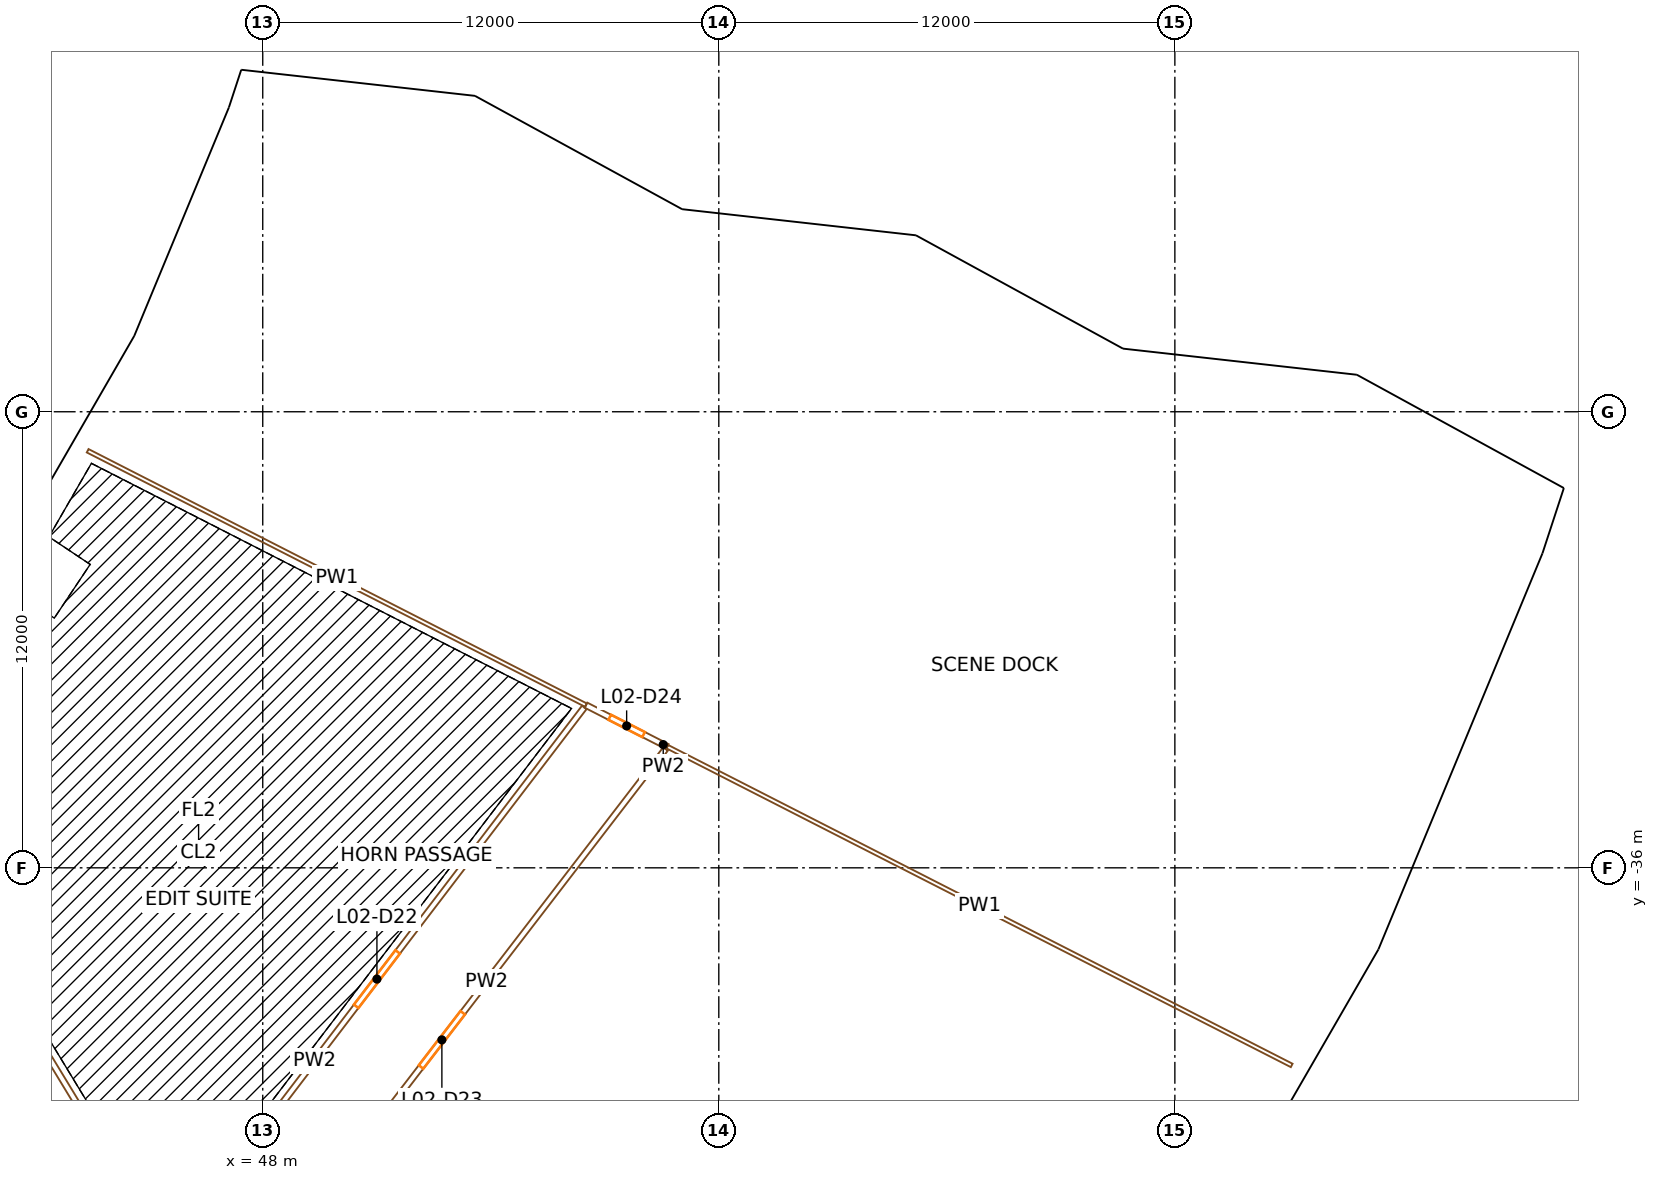
"""IFC4 building model, lengths in metres.
Left out: names, types, materials, properties, quantities, classifications, styles, units other than length and angle.
Written with IfcOpenShell. Run it as: python <this file> out.ifc"""

import sys

from ifc_helpers import new_model, si_unit, direction, frame, frame_2d, origin, origin_2d, place, context, subcontext, project, spatial, rectangle, extrude, element, fill, save


model = new_model("IFC4")
c1 = context("Model", 3, precision=1e-05, world=origin(), true_north=direction((0.0, 1.0)))
c2 = subcontext(c1, "Body", "Model", "MODEL_VIEW")
j1 = project(units=[si_unit("LENGTHUNIT", "METRE"), si_unit("PLANEANGLEUNIT", "RADIAN")], contexts=[c1])
p1 = place(None, origin())
s1 = spatial("IfcSite", under=j1, at=p1, CompositionType="ELEMENT")
p2 = place(p1, origin())
s2 = spatial("IfcBuilding", under=s1, at=p2, CompositionType="ELEMENT")
p3 = place(p2, frame((0.0, 0.0, 18.0)))
s3 = spatial("IfcBuildingStorey", under=s2, at=p3, CompositionType="ELEMENT", Elevation=18.0)
p4 = place(p3, frame((43.795, -38.407, 0.0), z_axis=(0.0, 0.0, 1.0), x_axis=(0.6593458151, 0.751839807479, 0.0)))
e1 = element("IfcColumn", 1, at=p4, inside=s3, PredefinedType="COLUMN", context=c2, shape_type="SweptSolid", body=[
    extrude(rectangle(XDim=1.4, YDim=1.8, at=origin_2d()), origin(), (0.0, 0.0, 1.0), 9.0),
])
p5 = place(p3, frame((42.197, -28.195, 0.0), z_axis=(0.0, 0.0, 1.0), x_axis=(0.55557023302, 0.831469612303, 0.0)))
e2 = element("IfcColumn", 2, at=p5, inside=s3, PredefinedType="COLUMN", context=c2, shape_type="SweptSolid", body=[
    extrude(rectangle(XDim=1.1, YDim=1.3, at=origin_2d()), origin(), (0.0, 0.0, 1.0), 9.0),
])
for number, where, z_axis, x_axis in (
    (3, (48.433, -32.362, 0.0), (0.0, 0.0, 1.0), (0.556, 0.831, 0.0)),
    (4, (64.647, -43.196, 0.0), (0.0, 0.0, 1.0), (0.556, 0.831, 0.0)),
):
    element("IfcColumn", number, at=place(p3, frame(where, z_axis=z_axis, x_axis=x_axis)), inside=s3, PredefinedType="COLUMN", context=c2, shape_type="SweptSolid", body=[
        extrude(rectangle(XDim=1.4, YDim=1.8, at=origin_2d()), origin(), (0.0, 0.0, 1.0), 9.0),
    ])
p6 = place(p3, frame((45.516, -22.446, 0.0), z_axis=(0.0, 0.0, 1.0), x_axis=(0.442288690219, 0.896872741533, 0.0)))
e5 = element("IfcColumn", 5, at=p6, inside=s3, PredefinedType="COLUMN", context=c2, shape_type="SweptSolid", body=[
    extrude(rectangle(XDim=1.1, YDim=1.3, at=origin_2d()), origin(), (0.0, 0.0, 1.0), 9.0),
])
for number, where, z_axis, x_axis in (
    (6, (52.243, -25.763, 0.0), (0.0, 0.0, 1.0), (0.442, 0.897, 0.0)),
    (7, (69.732, -34.388, 0.0), (0.0, 0.0, 1.0), (0.442, 0.897, 0.0)),
):
    element("IfcColumn", number, at=place(p3, frame(where, z_axis=z_axis, x_axis=x_axis)), inside=s3, PredefinedType="COLUMN", context=c2, shape_type="SweptSolid", body=[
        extrude(rectangle(XDim=1.4, YDim=1.8, at=origin_2d()), origin(), (0.0, 0.0, 1.0), 9.0),
    ])
for number, where, z_axis, x_axis in (
    (8, (76.458, -37.705, 0.0), (0.0, 0.0, 1.0), (0.442, 0.897, 0.0)),
    (9, (48.057, -16.313, 0.0), (0.0, 0.0, 1.0), (0.321, 0.947, 0.0)),
):
    element("IfcColumn", number, at=place(p3, frame(where, z_axis=z_axis, x_axis=x_axis)), inside=s3, PredefinedType="COLUMN", context=c2, shape_type="SweptSolid", body=[
        extrude(rectangle(XDim=1.1, YDim=1.3, at=origin_2d()), origin(), (0.0, 0.0, 1.0), 9.0),
    ])
for number, where, z_axis, x_axis in (
    (10, (55.159, -18.724, 0.0), (0.0, 0.0, 1.0), (0.321, 0.947, 0.0)),
    (11, (73.624, -24.992, 0.0), (0.0, 0.0, 1.0), (0.321, 0.947, 0.0)),
):
    element("IfcColumn", number, at=place(p3, frame(where, z_axis=z_axis, x_axis=x_axis)), inside=s3, PredefinedType="COLUMN", context=c2, shape_type="SweptSolid", body=[
        extrude(rectangle(XDim=1.4, YDim=1.8, at=origin_2d()), origin(), (0.0, 0.0, 1.0), 9.0),
    ])
p7 = place(p3, frame((80.726, -27.403, 0.0), z_axis=(0.0, 0.0, 1.0), x_axis=(0.321439465303, 0.946930129495, 0.0)))
e12 = element("IfcColumn", 12, at=p7, inside=s3, PredefinedType="COLUMN", context=c2, shape_type="SweptSolid", body=[
    extrude(rectangle(XDim=1.1, YDim=1.3, at=origin_2d()), origin(), (0.0, 0.0, 1.0), 9.0),
])
p8 = place(p3, frame((81.734, -25.99, 0.0), z_axis=(0.0, 0.0, 1.0), x_axis=(-0.877209140108, 0.480108450781, 0.0)))
e13 = element("IfcWall", 13, at=p8, inside=s3, PredefinedType="SOLIDWALL", context=c2, shape_type="SweptSolid", body=[
    extrude(rectangle(XDim=5.553, YDim=0.45, at=frame_2d((2.776, 0.0))), origin(), (0.0, 0.0, 1.0), 7.7),
])
p9 = place(p3, frame((76.804, -23.255, 0.0), z_axis=(0.0, 0.0, 1.0), x_axis=(-0.993813805196, 0.111059086081, 0.0)))
e14 = element("IfcWall", 14, at=p9, inside=s3, PredefinedType="SOLIDWALL", context=c2, shape_type="SweptSolid", body=[
    extrude(rectangle(XDim=6.362, YDim=0.45, at=frame_2d((3.181, 0.0))), origin(), (0.0, 0.0, 1.0), 7.7),
])
p10 = place(p3, frame((70.422, -22.479, 0.0), z_axis=(0.0, 0.0, 1.0), x_axis=(-0.877230259454, 0.480069861477, 0.0)))
e15 = element("IfcWall", 15, at=p10, inside=s3, PredefinedType="SOLIDWALL", context=c2, shape_type="SweptSolid", body=[
    extrude(rectangle(XDim=5.884, YDim=0.45, at=frame_2d((2.942, 0.0))), origin(), (0.0, 0.0, 1.0), 7.7),
])
p11 = place(p3, frame((65.202, -19.585, 0.0), z_axis=(0.0, 0.0, 1.0), x_axis=(-0.993818963433, 0.111012917816, 0.0)))
e16 = element("IfcWall", 16, at=p11, inside=s3, PredefinedType="SOLIDWALL", context=c2, shape_type="SweptSolid", body=[
    extrude(rectangle(XDim=6.36, YDim=0.45, at=frame_2d((3.18, 0.0))), origin(), (0.0, 0.0, 1.0), 7.7),
])
p12 = place(p3, frame((58.822, -18.81, 0.0), z_axis=(0.0, 0.0, 1.0), x_axis=(-0.87728135657, 0.479976480064, 0.0)))
e17 = element("IfcWall", 17, at=p12, inside=s3, PredefinedType="SOLIDWALL", context=c2, shape_type="SweptSolid", body=[
    extrude(rectangle(XDim=5.885, YDim=0.45, at=frame_2d((2.943, 0.0))), origin(), (0.0, 0.0, 1.0), 7.7),
])
p13 = place(p3, frame((53.599, -15.916, 0.0), z_axis=(0.0, 0.0, 1.0), x_axis=(-0.993827533543, 0.110936168908, 0.0)))
e18 = element("IfcWall", 18, at=p13, inside=s3, PredefinedType="SOLIDWALL", context=c2, shape_type="SweptSolid", body=[
    extrude(rectangle(XDim=6.265, YDim=0.45, at=frame_2d((3.133, 0.0))), origin(), (0.0, 0.0, 1.0), 7.7),
])
p14 = place(p3, frame((44.792, -22.155, 0.0), z_axis=(0.0, 0.0, 1.0), x_axis=(-0.50000447882, -0.866022817921, 0.0)))
e19 = element("IfcWall", 19, at=p14, inside=s3, PredefinedType="SOLIDWALL", context=c2, shape_type="SweptSolid", body=[
    extrude(rectangle(XDim=6.419, YDim=0.45, at=frame_2d((3.21, 0.0))), origin(), (0.0, 0.0, 1.0), 7.7),
])
p15 = place(p3, frame((47.327, -16.056, 0.0), z_axis=(0.0, 0.0, 1.0), x_axis=(-0.382692796414, -0.92387565374, 0.0)))
e20 = element("IfcWall", 20, at=p15, inside=s3, PredefinedType="SOLIDWALL", context=c2, shape_type="SweptSolid", body=[
    extrude(rectangle(XDim=6.576, YDim=0.45, at=frame_2d((3.288, 0.0))), origin(), (0.0, 0.0, 1.0), 7.7),
])
p16 = place(p3, frame((47.509, -15.497, 0.0), z_axis=(0.0, 0.0, 1.0), x_axis=(-0.311474670585, -0.950254455177, 0.0)))
e21 = element("IfcWall", 21, at=p16, inside=s3, PredefinedType="SOLIDWALL", context=c2, shape_type="SweptSolid", body=[
    extrude(rectangle(XDim=0.571, YDim=0.45, at=frame_2d((0.285, 0.0))), origin(), (0.0, 0.0, 1.0), 7.7),
])
p17 = place(p3, frame((71.512, -47.819, 0.0), z_axis=(0.0, 0.0, 1.0), x_axis=(0.500001430823, 0.866024577697, 0.0)))
e22 = element("IfcWall", 22, at=p17, inside=s3, PredefinedType="SOLIDWALL", context=c2, shape_type="SweptSolid", body=[
    extrude(rectangle(XDim=11.312, YDim=0.45, at=frame_2d((5.656, 0.0))), origin(), (0.0, 0.0, 1.0), 7.7),
])
p18 = place(p3, frame((77.176, -37.993, 0.0), z_axis=(0.0, 0.0, 1.0), x_axis=(0.382700611107, 0.923872416656, 0.0)))
e23 = element("IfcWall", 23, at=p18, inside=s3, PredefinedType="SOLIDWALL", context=c2, shape_type="SweptSolid", body=[
    extrude(rectangle(XDim=11.168, YDim=0.45, at=frame_2d((5.584, 0.0))), origin(), (0.0, 0.0, 1.0), 7.7),
])
p19 = place(p3, frame((81.457, -27.66, 0.0), z_axis=(0.0, 0.0, 1.0), x_axis=(0.311621150825, 0.95020642934, 0.0)))
e24 = element("IfcWall", 24, at=p19, inside=s3, PredefinedType="SOLIDWALL", context=c2, shape_type="SweptSolid", body=[
    extrude(rectangle(XDim=1.846, YDim=0.45, at=frame_2d((0.923, 0.0))), origin(), (0.0, 0.0, 1.0), 7.7),
])
p20 = place(p3, frame((41.648, -39.789, 0.0), z_axis=(0.0, 0.0, 1.0), x_axis=(0.519150554232, -0.854682807854, 0.0)))
e25 = element("IfcWall", 25, at=p20, inside=s3, PredefinedType="PARTITIONING", context=c2, shape_type="SweptSolid", body=[
    extrude(rectangle(XDim=7.5, YDim=0.15, at=frame_2d((3.75, 0.0))), origin(), (0.0, 0.0, 1.0), 7.6),
])
p21 = place(p3, frame((45.549, -46.076, 0.0), z_axis=(0.0, 0.0, 1.0), x_axis=(0.606707633542, 0.794925057727, 0.0)))
e26 = element("IfcWall", 26, at=p21, inside=s3, PredefinedType="PARTITIONING", context=c2, shape_type="SweptSolid", body=[
    extrude(rectangle(XDim=17.985, YDim=0.15, at=frame_2d((8.992, 0.0))), origin(), (0.0, 0.0, 1.0), 7.6),
])
p22 = place(p21, frame((8.092, 0.0, 0.0)))
e27 = element("IfcOpeningElement", 27, at=p22, cuts=e26, PredefinedType="OPENING", context=c2, shape_type="SweptSolid", body=[
    extrude(rectangle(XDim=1.8, YDim=2.1, at=frame_2d((0.9, 1.05))), frame((0.0, 0.085, 0.0), z_axis=(0.0, -1.0, 0.0), x_axis=(1.0, 0.0, 0.0)), (0.0, 0.0, 1.0), 0.17),
])
p23 = place(p3, frame((58.599, -32.872, 0.0), z_axis=(0.0, 0.0, 1.0), x_axis=(-0.609502407435, -0.792784217383, 0.0)))
e28 = element("IfcWall", 28, at=p23, inside=s3, PredefinedType="PARTITIONING", context=c2, shape_type="SweptSolid", body=[
    extrude(rectangle(XDim=19.312, YDim=0.15, at=frame_2d((9.656, 0.0))), origin(), (0.0, 0.0, 1.0), 7.6),
])
p24 = place(p23, frame((8.756, 0.0, 0.0)))
e29 = element("IfcOpeningElement", 29, at=p24, cuts=e28, PredefinedType="OPENING", context=c2, shape_type="SweptSolid", body=[
    extrude(rectangle(XDim=1.8, YDim=2.1, at=frame_2d((0.9, 1.05))), frame((0.0, 0.085, 0.0), z_axis=(0.0, -1.0, 0.0), x_axis=(1.0, 0.0, 0.0)), (0.0, 0.0, 1.0), 0.17),
])
p25 = place(p3, frame((56.505, -31.72, 0.0), z_axis=(0.0, 0.0, 1.0), x_axis=(-0.890651277392, 0.45468703751, 0.0)))
e30 = element("IfcWall", 30, at=p25, inside=s3, PredefinedType="PARTITIONING", context=c2, shape_type="SweptSolid", body=[
    extrude(rectangle(XDim=14.722, YDim=0.1, at=frame_2d((7.361, 0.0))), origin(), (0.0, 0.0, 1.0), 7.6),
])
p26 = place(p3, frame((56.505, -31.72, 0.0), z_axis=(0.0, 0.0, 1.0), x_axis=(0.890655190194, -0.454679372944, 0.0)))
e31 = element("IfcWall", 31, at=p26, inside=s3, PredefinedType="PARTITIONING", context=c2, shape_type="SweptSolid", body=[
    extrude(rectangle(XDim=2.402, YDim=0.15, at=frame_2d((1.201, 0.0))), origin(), (0.0, 0.0, 1.0), 7.6),
])
p27 = place(p26, frame((0.701, 0.0, 0.0)))
e32 = element("IfcOpeningElement", 32, at=p27, cuts=e31, PredefinedType="OPENING", context=c2, shape_type="SweptSolid", body=[
    extrude(rectangle(XDim=1.0, YDim=2.1, at=frame_2d((0.5, 1.05))), frame((0.0, 0.085, 0.0), z_axis=(0.0, -1.0, 0.0), x_axis=(1.0, 0.0, 0.0)), (0.0, 0.0, 1.0), 0.17),
])
p28 = place(p3, frame((75.074, -41.2, 0.0), z_axis=(0.0, 0.0, 1.0), x_axis=(-0.890653048048, 0.454683569093, 0.0)))
e33 = element("IfcWall", 33, at=p28, inside=s3, PredefinedType="PARTITIONING", context=c2, shape_type="SweptSolid", body=[
    extrude(rectangle(XDim=18.447, YDim=0.1, at=frame_2d((9.223, 0.0))), origin(), (0.0, 0.0, 1.0), 7.6),
])
p29 = place(p22, origin())
e34 = element("IfcDoor", 34, at=p29, inside=s3, OperationType="DOUBLE_DOOR_SINGLE_SWING", PredefinedType="DOOR", context=c2, shape_type="SweptSolid", body=[
    extrude(rectangle(XDim=1.8, YDim=2.1, at=frame_2d((0.9, 1.05))), frame((0.0, 0.025, 0.0), z_axis=(0.0, -1.0, 0.0), x_axis=(1.0, 0.0, 0.0)), (0.0, 0.0, 1.0), 0.05),
])
fill(e27, e34)
p30 = place(p24, origin())
e35 = element("IfcDoor", 35, at=p30, inside=s3, OperationType="DOUBLE_DOOR_SINGLE_SWING", PredefinedType="DOOR", context=c2, shape_type="SweptSolid", body=[
    extrude(rectangle(XDim=1.8, YDim=2.1, at=frame_2d((0.9, 1.05))), frame((0.0, 0.025, 0.0), z_axis=(0.0, -1.0, 0.0), x_axis=(1.0, 0.0, 0.0)), (0.0, 0.0, 1.0), 0.05),
])
fill(e29, e35)
p31 = place(p27, origin())
e36 = element("IfcDoor", 36, at=p31, inside=s3, OperationType="SINGLE_SWING_RIGHT", PredefinedType="DOOR", context=c2, shape_type="SweptSolid", body=[
    extrude(rectangle(XDim=1.0, YDim=2.1, at=frame_2d((0.5, 1.05))), frame((0.0, 0.025, 0.0), z_axis=(0.0, -1.0, 0.0), x_axis=(1.0, 0.0, 0.0)), (0.0, 0.0, 1.0), 0.05),
])
fill(e32, e36)
save(model, sys.argv[1])
